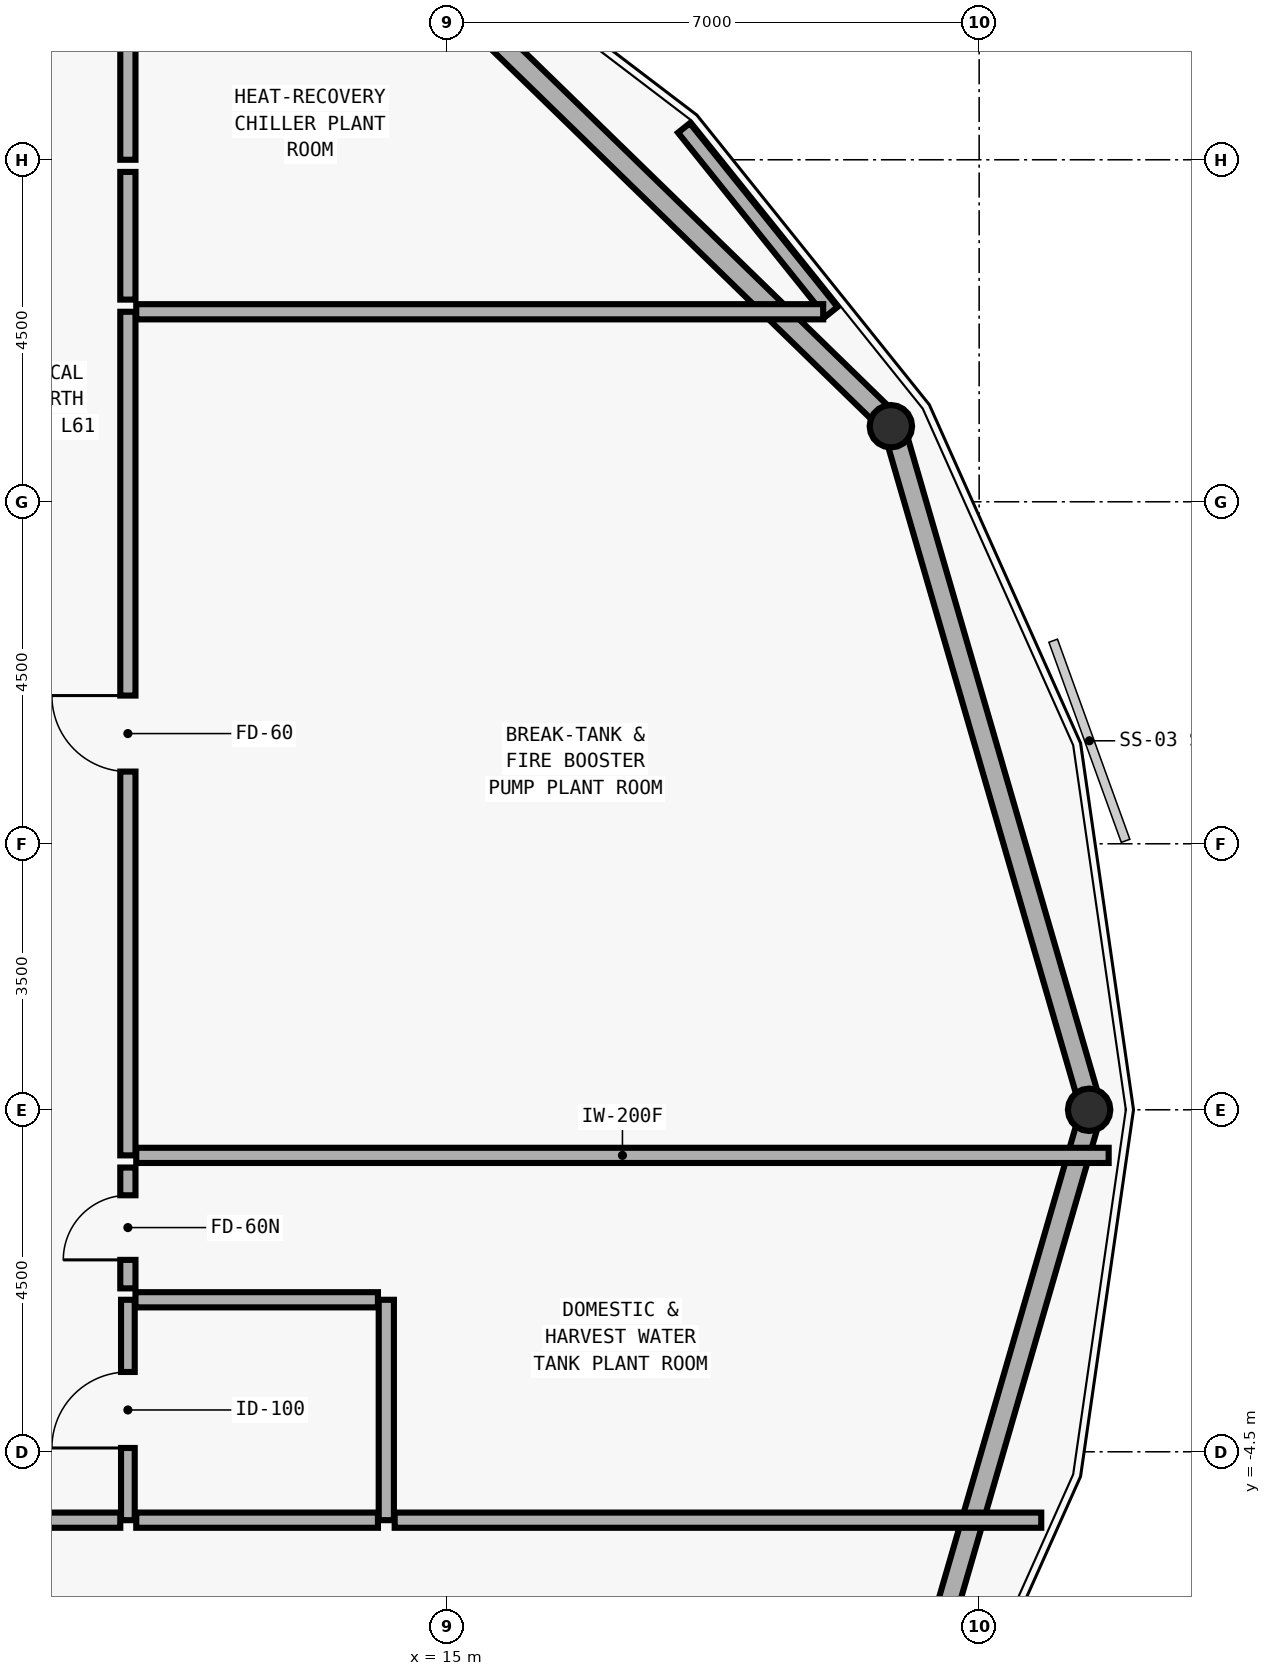
"""IFC4 building model, lengths in metres.
Left out: names, types, materials, properties, quantities, classifications, styles, units other than length and angle.
Written with IfcOpenShell. Run it as: python <this file> out.ifc"""

import sys

from ifc_helpers import new_model, si_unit, direction, frame, frame_2d, origin, origin_2d, place, context, subcontext, project, spatial, rectangle, hollow_circle, extrude, element, fill, save


model = new_model("IFC4")
c1 = context("Model", 3, precision=1e-05, world=origin(), true_north=direction((0.0, 1.0)))
c2 = subcontext(c1, "Body", "Model", "MODEL_VIEW")
j1 = project(units=[si_unit("LENGTHUNIT", "METRE"), si_unit("PLANEANGLEUNIT", "RADIAN")], contexts=[c1])
p1 = place(None, origin())
s1 = spatial("IfcSite", under=j1, at=p1, CompositionType="ELEMENT")
p2 = place(p1, origin())
s2 = spatial("IfcBuilding", under=s1, at=p2, CompositionType="ELEMENT")
p3 = place(p2, frame((0.0, 0.0, 240.0)))
s3 = spatial("IfcBuildingStorey", under=s2, at=p3, CompositionType="ELEMENT", Elevation=240.0)
p4 = place(p3, frame((23.481, 0.0, 0.0), z_axis=(-0.012626173678, 0.0, 0.999920286692), x_axis=(0.0, -1.0, 0.0)))
e1 = element("IfcColumn", 1, at=p4, inside=s3, PredefinedType="COLUMN", context=c2, shape_type="SweptSolid", body=[
    extrude(hollow_circle(Radius=0.28, WallThickness=0.02, at=origin_2d()), origin(), (0.0, 0.0, 1.0), 5.375),
])
p5 = place(p3, frame((20.868, 9.002, 0.0), z_axis=(-0.010945874758, -0.003133881155, 0.999935181207), x_axis=(0.275247949014, -0.961373271193, 0.0)))
e2 = element("IfcColumn", 2, at=p5, inside=s3, PredefinedType="COLUMN", context=c2, shape_type="SweptSolid", body=[
    extrude(hollow_circle(Radius=0.28, WallThickness=0.02, at=origin_2d()), origin(), (0.0, 0.0, 1.0), 5.375),
])
p6 = place(p3, frame((20.933, 8.777, 0.0), z_axis=(0.0, 0.0, 1.0), x_axis=(0.278734340677, -0.960368245689, 0.0)))
e3 = element("IfcWall", 3, at=p6, inside=s3, PredefinedType="SOLIDWALL", context=c2, shape_type="SweptSolid", body=[
    extrude(rectangle(XDim=8.905, YDim=0.28, at=frame_2d((4.453, 0.0))), origin(), (0.0, 0.0, 1.0), 4.77),
])
p7 = place(p3, frame((14.266, 15.429, 0.0), z_axis=(0.0, 0.0, 1.0), x_axis=(0.716545930731, -0.697539912229, 0.0)))
e4 = element("IfcWall", 4, at=p7, inside=s3, PredefinedType="SOLIDWALL", context=c2, shape_type="SweptSolid", body=[
    extrude(rectangle(XDim=8.979, YDim=0.28, at=frame_2d((4.49, 0.0))), origin(), (0.0, 0.0, 1.0), 4.77),
])
p8 = place(p3, frame((23.416, -0.225, 0.0), z_axis=(0.0, 0.0, 1.0), x_axis=(-0.278734340677, -0.960368245689, 0.0)))
e5 = element("IfcWall", 5, at=p8, inside=s3, PredefinedType="SOLIDWALL", context=c2, shape_type="SweptSolid", body=[
    extrude(rectangle(XDim=8.905, YDim=0.28, at=frame_2d((4.453, 0.0))), origin(), (0.0, 0.0, 1.0), 4.77),
])
p9 = place(p3, frame((10.8, -5.4, 0.0), z_axis=(0.0, 0.0, 1.0), x_axis=(0.0, 1.0, 0.0)))
e6 = element("IfcWall", 6, at=p9, inside=s3, PredefinedType="PLUMBINGWALL", context=c2, shape_type="SweptSolid", body=[
    extrude(rectangle(XDim=2.9, YDim=0.18, at=frame_2d((1.45, 0.0))), origin(), (0.0, 0.0, 1.0), 5.16),
])
p10 = place(p9, frame((0.95, 0.0, 0.0)))
e7 = element("IfcOpeningElement", 7, at=p10, cuts=e6, PredefinedType="OPENING", context=c2, shape_type="SweptSolid", body=[
    extrude(rectangle(XDim=1.0, YDim=2.1, at=frame_2d((0.5, 1.05))), frame((0.0, 0.1, 0.0), z_axis=(0.0, -1.0, 0.0), x_axis=(1.0, 0.0, 0.0)), (0.0, 0.0, 1.0), 0.2),
])
p11 = place(p3, frame((10.8, -0.6, 0.0), z_axis=(0.0, 0.0, 1.0), x_axis=(0.0, 1.0, 0.0)))
e8 = element("IfcWall", 8, at=p11, inside=s3, PredefinedType="MOVABLE", context=c2, shape_type="SweptSolid", body=[
    extrude(rectangle(XDim=11.1, YDim=0.2, at=frame_2d((5.55, 0.0))), origin(), (0.0, 0.0, 1.0), 5.16),
])
p12 = place(p11, frame((5.05, 0.0, 0.0)))
e9 = element("IfcOpeningElement", 9, at=p12, cuts=e8, PredefinedType="OPENING", context=c2, shape_type="SweptSolid", body=[
    extrude(rectangle(XDim=1.0, YDim=2.1, at=frame_2d((0.5, 1.05))), frame((0.0, 0.11, 0.0), z_axis=(0.0, -1.0, 0.0), x_axis=(1.0, 0.0, 0.0)), (0.0, 0.0, 1.0), 0.22),
])
p13 = place(p3, frame((10.8, -2.35, 0.0), z_axis=(0.0, 0.0, 1.0), x_axis=(0.0, 1.0, 0.0)))
e10 = element("IfcWall", 10, at=p13, inside=s3, PredefinedType="MOVABLE", context=c2, shape_type="SweptSolid", body=[
    extrude(rectangle(XDim=1.59, YDim=0.2, at=frame_2d((0.795, 0.0))), origin(), (0.0, 0.0, 1.0), 5.16),
])
p14 = place(p13, frame((0.375, 0.0, 0.0)))
e11 = element("IfcOpeningElement", 11, at=p14, cuts=e10, PredefinedType="OPENING", context=c2, shape_type="SweptSolid", body=[
    extrude(rectangle(XDim=0.85, YDim=2.1, at=frame_2d((0.425, 1.05))), frame((0.0, 0.11, 0.0), z_axis=(0.0, -1.0, 0.0), x_axis=(1.0, 0.0, 0.0)), (0.0, 0.0, 1.0), 0.22),
])
p15 = place(p3, frame((10.8, 12.5, 0.0), z_axis=(0.0, 0.0, 1.0), x_axis=(0.0, 1.0, 0.0)))
e12 = element("IfcWall", 12, at=p15, inside=s3, PredefinedType="MOVABLE", context=c2, shape_type="SweptSolid", body=[
    extrude(rectangle(XDim=2.09, YDim=0.2, at=frame_2d((1.045, 0.0))), origin(), (0.0, 0.0, 1.0), 5.16),
])
p16 = place(p3, frame((10.8, 10.66, 0.0), z_axis=(0.0, 0.0, 1.0), x_axis=(0.0, 1.0, 0.0)))
e13 = element("IfcWall", 13, at=p16, inside=s3, PredefinedType="MOVABLE", context=c2, shape_type="SweptSolid", body=[
    extrude(rectangle(XDim=1.68, YDim=0.2, at=frame_2d((0.84, 0.0))), origin(), (0.0, 0.0, 1.0), 5.16),
])
p17 = place(p3, frame((8.11, -5.4, 0.0), z_axis=(0.0, 0.0, 1.0), x_axis=(1.0, 0.0, 0.0)))
e14 = element("IfcWall", 14, at=p17, inside=s3, PredefinedType="MOVABLE", context=c2, shape_type="SweptSolid", body=[
    extrude(rectangle(XDim=2.59, YDim=0.2, at=frame_2d((1.295, 0.0))), origin(), (0.0, 0.0, 1.0), 5.16),
])
p18 = place(p3, frame((14.2, -2.5, 0.0), z_axis=(0.0, 0.0, 1.0), x_axis=(0.0, -1.0, 0.0)))
e15 = element("IfcWall", 15, at=p18, inside=s3, PredefinedType="MOVABLE", context=c2, shape_type="SweptSolid", body=[
    extrude(rectangle(XDim=2.9, YDim=0.2, at=frame_2d((1.45, 0.0))), origin(), (0.0, 0.0, 1.0), 4.872),
])
p19 = place(p3, frame((10.9, -2.5, 0.0), z_axis=(0.0, 0.0, 1.0), x_axis=(1.0, 0.0, 0.0)))
e16 = element("IfcWall", 16, at=p19, inside=s3, PredefinedType="MOVABLE", context=c2, shape_type="SweptSolid", body=[
    extrude(rectangle(XDim=3.19, YDim=0.2, at=frame_2d((1.595, 0.0))), origin(), (0.0, 0.0, 1.0), 5.16),
])
p20 = place(p3, frame((14.09, -5.4, 0.0), z_axis=(0.0, 0.0, 1.0), x_axis=(-1.0, 0.0, 0.0)))
e17 = element("IfcWall", 17, at=p20, inside=s3, PredefinedType="MOVABLE", context=c2, shape_type="SweptSolid", body=[
    extrude(rectangle(XDim=3.18, YDim=0.2, at=frame_2d((1.59, 0.0))), origin(), (0.0, 0.0, 1.0), 5.16),
])
p21 = place(p3, frame((18.116, 12.919, 0.0), z_axis=(0.0, 0.0, 1.0), x_axis=(0.626066551514, -0.779769628208, 0.0)))
e18 = element("IfcWall", 18, at=p21, inside=s3, PredefinedType="MOVABLE", context=c2, shape_type="SweptSolid", body=[
    extrude(rectangle(XDim=3.102, YDim=0.2, at=frame_2d((1.551, 0.0))), origin(), (0.0, 0.0, 1.0), 4.782),
])
p22 = place(p3, frame((19.948, 10.5, 0.0), z_axis=(0.0, 0.0, 1.0), x_axis=(-1.0, 0.0, 0.0)))
e19 = element("IfcWall", 19, at=p22, inside=s3, PredefinedType="MOVABLE", context=c2, shape_type="SweptSolid", body=[
    extrude(rectangle(XDim=9.038, YDim=0.2, at=frame_2d((4.519, 0.0))), origin(), (0.0, 0.0, 1.0), 4.692),
])
p23 = place(p3, frame((23.704, -0.6, 0.0), z_axis=(0.0, 0.0, 1.0), x_axis=(-1.0, 0.0, 0.0)))
e20 = element("IfcWall", 20, at=p23, inside=s3, PredefinedType="MOVABLE", context=c2, shape_type="SweptSolid", body=[
    extrude(rectangle(XDim=12.794, YDim=0.2, at=frame_2d((6.397, 0.0))), origin(), (0.0, 0.0, 1.0), 4.692),
])
p24 = place(p3, frame((22.817, -5.4, 0.0), z_axis=(0.0, 0.0, 1.0), x_axis=(-1.0, 0.0, 0.0)))
e21 = element("IfcWall", 21, at=p24, inside=s3, PredefinedType="MOVABLE", context=c2, shape_type="SweptSolid", body=[
    extrude(rectangle(XDim=8.507, YDim=0.2, at=frame_2d((4.253, 0.0))), origin(), (0.0, 0.0, 1.0), 5.16),
])
p25 = place(p10, origin())
e22 = element("IfcDoor", 22, at=p25, inside=s3, OperationType="SINGLE_SWING_LEFT", PredefinedType="DOOR", context=c2, shape_type="SweptSolid", body=[
    extrude(rectangle(XDim=1.0, YDim=2.1, at=frame_2d((0.5, 1.05))), frame((0.0, 0.025, 0.0), z_axis=(0.0, -1.0, 0.0), x_axis=(1.0, 0.0, 0.0)), (0.0, 0.0, 1.0), 0.05),
])
fill(e7, e22)
p26 = place(p12, origin())
e23 = element("IfcDoor", 23, at=p26, inside=s3, OperationType="SINGLE_SWING_RIGHT", PredefinedType="DOOR", context=c2, shape_type="SweptSolid", body=[
    extrude(rectangle(XDim=1.0, YDim=2.1, at=frame_2d((0.5, 1.05))), frame((0.0, 0.025, 0.0), z_axis=(0.0, -1.0, 0.0), x_axis=(1.0, 0.0, 0.0)), (0.0, 0.0, 1.0), 0.05),
])
fill(e9, e23)
p27 = place(p14, origin())
e24 = element("IfcDoor", 24, at=p27, inside=s3, OperationType="SINGLE_SWING_LEFT", PredefinedType="DOOR", context=c2, shape_type="SweptSolid", body=[
    extrude(rectangle(XDim=0.85, YDim=2.1, at=frame_2d((0.425, 1.05))), frame((0.0, 0.025, 0.0), z_axis=(0.0, -1.0, 0.0), x_axis=(1.0, 0.0, 0.0)), (0.0, 0.0, 1.0), 0.05),
])
fill(e11, e24)
save(model, sys.argv[1])
